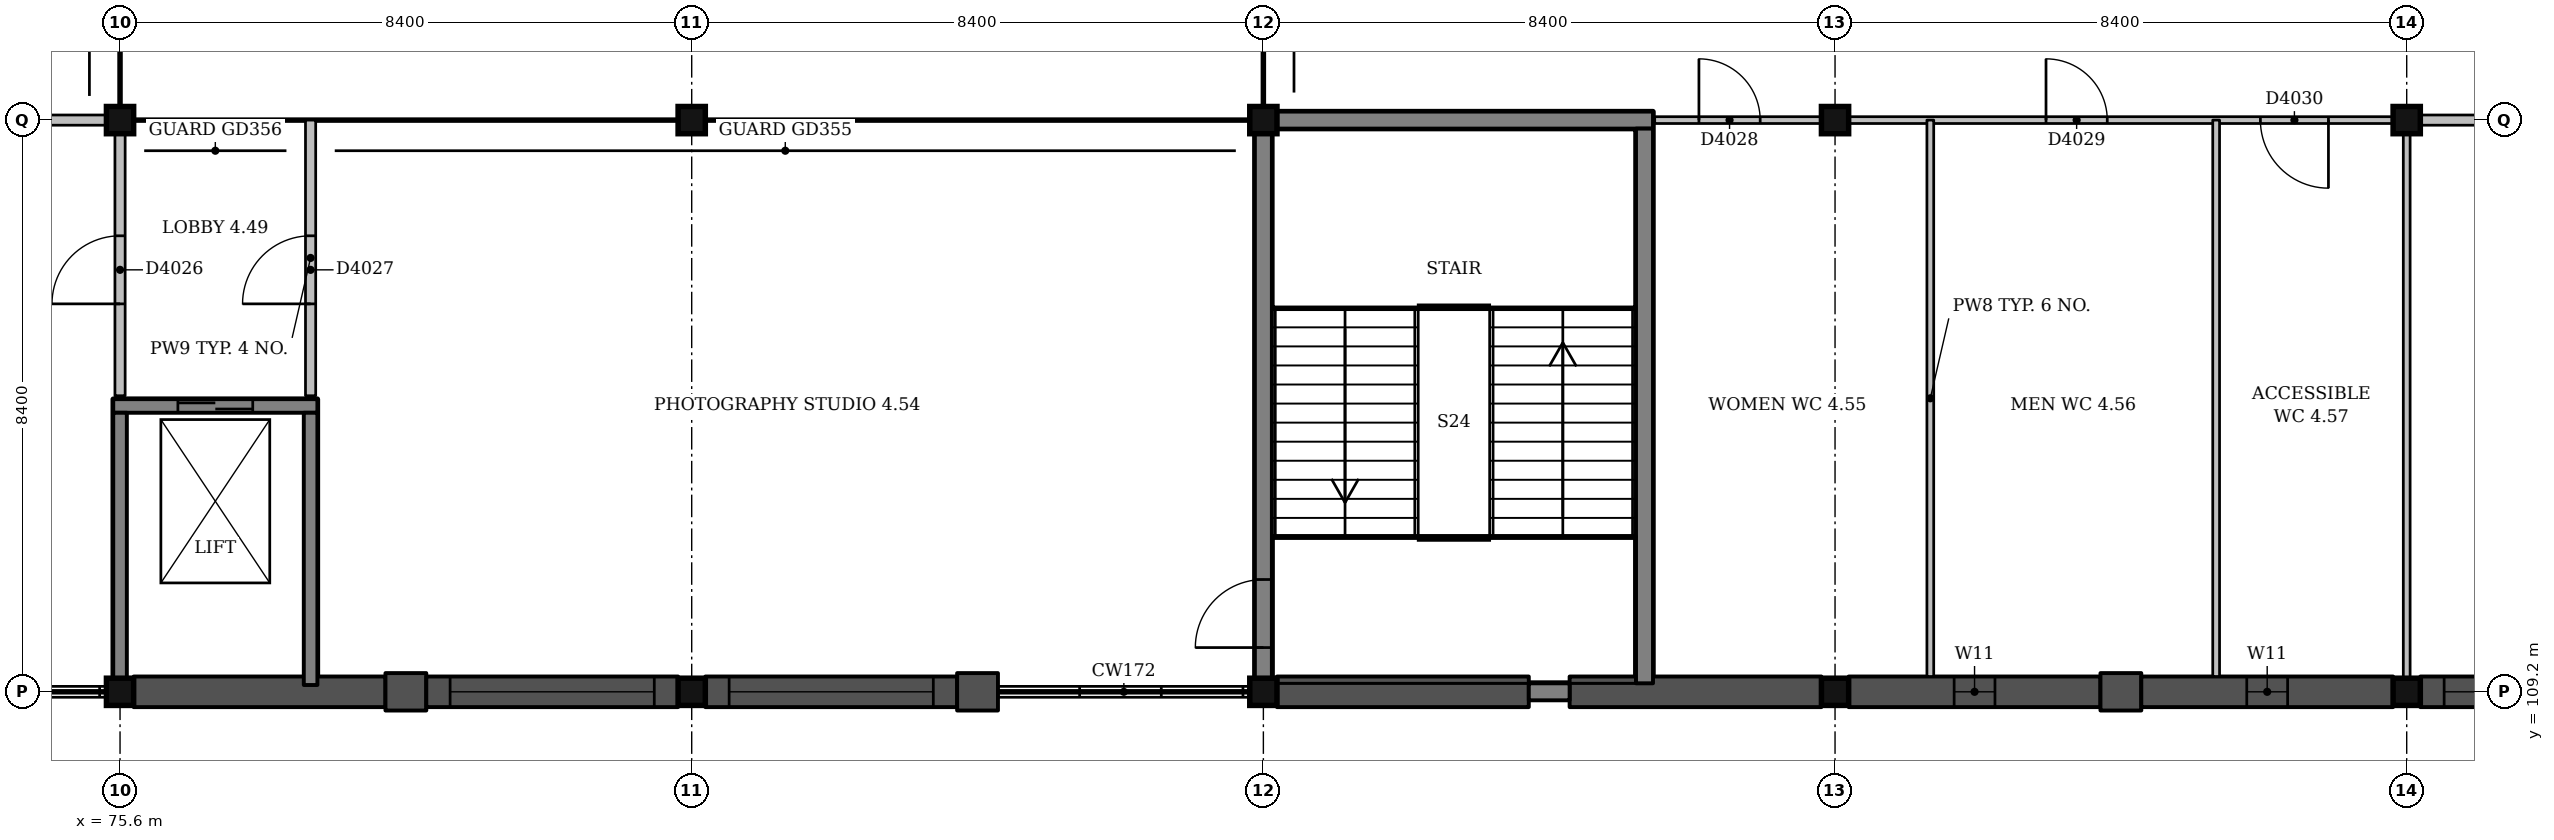
"""IFC4 building model, lengths in metres.
Left out: names, types, materials, properties, quantities, classifications, styles, units other than length and angle.
Written with IfcOpenShell. Run it as: python <this file> out.ifc"""

import sys

from ifc_helpers import new_model, si_unit, direction, frame, frame_2d, origin, origin_2d, place, context, subcontext, project, spatial, rectangle, extrude, element, fill, save


model = new_model("IFC4")
c1 = context("Model", 3, precision=1e-05, world=origin(), true_north=direction((0.0, 1.0)))
c2 = subcontext(c1, "Body", "Model", "MODEL_VIEW")
j1 = project(units=[si_unit("LENGTHUNIT", "METRE"), si_unit("PLANEANGLEUNIT", "RADIAN")], contexts=[c1])
p1 = place(None, origin())
s1 = spatial("IfcSite", under=j1, at=p1, CompositionType="ELEMENT")
p2 = place(p1, origin())
s2 = spatial("IfcBuilding", under=s1, at=p2, CompositionType="ELEMENT")
p3 = place(p2, frame((0.0, 0.0, 18.0)))
s3 = spatial("IfcBuildingStorey", under=s2, at=p3, CompositionType="ELEMENT", Elevation=18.0)
for number, where, z_axis, x_axis in (
    (1, (75.6, 109.2, 0.0), (0.0, 0.0, 1.0), (1.0, 0.0, 0.0)),
    (2, (75.6, 117.6, 0.0), (0.0, 0.0, 1.0), (1.0, 0.0, 0.0)),
    (3, (84.0, 109.2, 0.0), (0.0, 0.0, 1.0), (1.0, 0.0, 0.0)),
    (4, (84.0, 117.6, 0.0), (0.0, 0.0, 1.0), (1.0, 0.0, 0.0)),
    (5, (92.4, 109.2, 0.0), (0.0, 0.0, 1.0), (1.0, 0.0, 0.0)),
    (6, (92.4, 117.6, 0.0), (0.0, 0.0, 1.0), (1.0, 0.0, 0.0)),
    (7, (100.8, 109.2, 0.0), (0.0, 0.0, 1.0), (1.0, 0.0, 0.0)),
    (8, (100.8, 117.6, 0.0), (0.0, 0.0, 1.0), (1.0, 0.0, 0.0)),
    (9, (109.2, 109.2, 0.0), (0.0, 0.0, 1.0), (1.0, 0.0, 0.0)),
    (10, (109.2, 117.6, 0.0), (0.0, 0.0, 1.0), (1.0, 0.0, 0.0)),
):
    element("IfcColumn", number, at=place(p3, frame(where, z_axis=z_axis, x_axis=x_axis)), inside=s3, PredefinedType="COLUMN", context=c2, shape_type="SweptSolid", body=[
        extrude(rectangle(XDim=0.4, YDim=0.4, at=origin_2d()), origin(), (0.0, 0.0, 1.0), 4.5),
    ])
p4 = place(p3, frame((75.5, 113.4, 0.0), z_axis=(0.0, 0.0, 1.0), x_axis=(1.0, 0.0, 0.0)))
e11 = element("IfcWall", 11, at=p4, inside=s3, PredefinedType="SHEAR", context=c2, shape_type="SweptSolid", body=[
    extrude(rectangle(XDim=3.0, YDim=0.2, at=frame_2d((1.5, 0.0))), origin(), (0.0, 0.0, 1.0), 4.5),
])
p5 = place(p4, frame((0.95, 0.0, 0.0)))
e12 = element("IfcOpeningElement", 12, at=p5, cuts=e11, PredefinedType="OPENING", context=c2, shape_type="SweptSolid", body=[
    extrude(rectangle(XDim=1.1, YDim=2.1, at=frame_2d((0.55, 1.05))), frame((0.0, 0.11, 0.0), z_axis=(0.0, -1.0, 0.0), x_axis=(1.0, 0.0, 0.0)), (0.0, 0.0, 1.0), 0.22),
])
p6 = place(p3, frame((75.6, 109.4, 0.0), z_axis=(0.0, 0.0, 1.0), x_axis=(0.0, 1.0, 0.0)))
e13 = element("IfcWall", 13, at=p6, inside=s3, PredefinedType="SHEAR", context=c2, shape_type="SweptSolid", body=[
    extrude(rectangle(XDim=3.9, YDim=0.2, at=frame_2d((1.95, 0.0))), origin(), (0.0, 0.0, 1.0), 4.5),
])
p7 = place(p3, frame((78.4, 109.3, 0.0), z_axis=(0.0, 0.0, 1.0), x_axis=(0.0, 1.0, 0.0)))
e14 = element("IfcWall", 14, at=p7, inside=s3, PredefinedType="SHEAR", context=c2, shape_type="SweptSolid", body=[
    extrude(rectangle(XDim=4.0, YDim=0.2, at=frame_2d((2.0, 0.0))), origin(), (0.0, 0.0, 1.0), 4.5),
])
p8 = place(p3, frame((92.6, 117.6, 0.0), z_axis=(0.0, 0.0, 1.0), x_axis=(1.0, 0.0, 0.0)))
e15 = element("IfcWall", 15, at=p8, inside=s3, PredefinedType="SHEAR", context=c2, shape_type="SweptSolid", body=[
    extrude(rectangle(XDim=5.525, YDim=0.25, at=frame_2d((2.762, 0.0))), origin(), (0.0, 0.0, 1.0), 4.5),
])
p9 = place(p3, frame((92.4, 109.4, 0.0), z_axis=(0.0, 0.0, 1.0), x_axis=(0.0, 1.0, 0.0)))
e16 = element("IfcWall", 16, at=p9, inside=s3, PredefinedType="SHEAR", context=c2, shape_type="SweptSolid", body=[
    extrude(rectangle(XDim=8.0, YDim=0.25, at=frame_2d((4.0, 0.0))), origin(), (0.0, 0.0, 1.0), 4.5),
])
p10 = place(p9, frame((0.45, 0.0, 0.0)))
e17 = element("IfcOpeningElement", 17, at=p10, cuts=e16, PredefinedType="OPENING", context=c2, shape_type="SweptSolid", body=[
    extrude(rectangle(XDim=1.0, YDim=2.1, at=frame_2d((0.5, 1.05))), frame((0.0, 0.135, 0.0), z_axis=(0.0, -1.0, 0.0), x_axis=(1.0, 0.0, 0.0)), (0.0, 0.0, 1.0), 0.27),
])
p11 = place(p3, frame((98.0, 109.325, 0.0), z_axis=(0.0, 0.0, 1.0), x_axis=(0.0, 1.0, 0.0)))
e18 = element("IfcWall", 18, at=p11, inside=s3, PredefinedType="SHEAR", context=c2, shape_type="SweptSolid", body=[
    extrude(rectangle(XDim=8.15, YDim=0.25, at=frame_2d((4.075, 0.0))), origin(), (0.0, 0.0, 1.0), 4.5),
])
p12 = place(p3, frame((75.8, 109.2, 0.0), z_axis=(0.0, 0.0, 1.0), x_axis=(1.0, 0.0, 0.0)))
e19 = element("IfcWall", 19, at=p12, inside=s3, PredefinedType="SOLIDWALL", context=c2, shape_type="SweptSolid", body=[
    extrude(rectangle(XDim=3.7, YDim=0.45, at=frame_2d((1.85, 0.0))), origin(), (0.0, 0.0, 1.0), 3.45),
])
p13 = place(p3, frame((79.5, 109.2, 0.0), z_axis=(0.0, 0.0, 1.0), x_axis=(1.0, 0.0, 0.0)))
e20 = element("IfcWall", 20, at=p13, inside=s3, PredefinedType="SOLIDWALL", context=c2, shape_type="SweptSolid", body=[
    extrude(rectangle(XDim=0.6, YDim=0.55, at=frame_2d((0.3, 0.0))), origin(), (0.0, 0.0, 1.0), 3.45),
])
p14 = place(p3, frame((80.1, 109.2, 0.0), z_axis=(0.0, 0.0, 1.0), x_axis=(1.0, 0.0, 0.0)))
e21 = element("IfcWall", 21, at=p14, inside=s3, PredefinedType="SOLIDWALL", context=c2, shape_type="SweptSolid", body=[
    extrude(rectangle(XDim=3.7, YDim=0.45, at=frame_2d((1.85, 0.0))), origin(), (0.0, 0.0, 1.0), 3.45),
])
p15 = place(p14, frame((0.35, 0.0, 0.9)))
e22 = element("IfcOpeningElement", 22, at=p15, cuts=e21, PredefinedType="OPENING", context=c2, shape_type="SweptSolid", body=[
    extrude(rectangle(XDim=3.0, YDim=2.1, at=frame_2d((1.5, 1.05))), frame((0.0, 0.235, 0.0), z_axis=(0.0, -1.0, 0.0), x_axis=(1.0, 0.0, 0.0)), (0.0, 0.0, 1.0), 0.47),
])
p16 = place(p3, frame((84.2, 109.2, 0.0), z_axis=(0.0, 0.0, 1.0), x_axis=(1.0, 0.0, 0.0)))
e23 = element("IfcWall", 23, at=p16, inside=s3, PredefinedType="SOLIDWALL", context=c2, shape_type="SweptSolid", body=[
    extrude(rectangle(XDim=3.7, YDim=0.45, at=frame_2d((1.85, 0.0))), origin(), (0.0, 0.0, 1.0), 4.2),
])
p17 = place(p16, frame((0.35, 0.0, 0.9)))
e24 = element("IfcOpeningElement", 24, at=p17, cuts=e23, PredefinedType="OPENING", context=c2, shape_type="SweptSolid", body=[
    extrude(rectangle(XDim=3.0, YDim=2.1, at=frame_2d((1.5, 1.05))), frame((0.0, 0.235, 0.0), z_axis=(0.0, -1.0, 0.0), x_axis=(1.0, 0.0, 0.0)), (0.0, 0.0, 1.0), 0.47),
])
p18 = place(p3, frame((87.9, 109.2, 0.0), z_axis=(0.0, 0.0, 1.0), x_axis=(1.0, 0.0, 0.0)))
e25 = element("IfcWall", 25, at=p18, inside=s3, PredefinedType="SOLIDWALL", context=c2, shape_type="SweptSolid", body=[
    extrude(rectangle(XDim=0.6, YDim=0.55, at=frame_2d((0.3, 0.0))), origin(), (0.0, 0.0, 1.0), 4.2),
])
p19 = place(p3, frame((92.6, 109.2, 0.0), z_axis=(0.0, 0.0, 1.0), x_axis=(1.0, 0.0, 0.0)))
e26 = element("IfcWall", 26, at=p19, inside=s3, PredefinedType="SOLIDWALL", context=c2, shape_type="SweptSolid", body=[
    extrude(rectangle(XDim=3.7, YDim=0.45, at=frame_2d((1.85, 0.0))), origin(), (0.0, 0.0, 1.0), 3.45),
])
p20 = place(p3, frame((96.9, 109.2, 0.0), z_axis=(0.0, 0.0, 1.0), x_axis=(1.0, 0.0, 0.0)))
e27 = element("IfcWall", 27, at=p20, inside=s3, PredefinedType="SOLIDWALL", context=c2, shape_type="SweptSolid", body=[
    extrude(rectangle(XDim=3.7, YDim=0.45, at=frame_2d((1.85, 0.0))), origin(), (0.0, 0.0, 1.0), 3.45),
])
p21 = place(p3, frame((101.0, 109.2, 0.0), z_axis=(0.0, 0.0, 1.0), x_axis=(1.0, 0.0, 0.0)))
e28 = element("IfcWall", 28, at=p21, inside=s3, PredefinedType="SOLIDWALL", context=c2, shape_type="SweptSolid", body=[
    extrude(rectangle(XDim=3.7, YDim=0.45, at=frame_2d((1.85, 0.0))), origin(), (0.0, 0.0, 1.0), 3.45),
])
p22 = place(p21, frame((1.55, 0.0, 1.5)))
e29 = element("IfcOpeningElement", 29, at=p22, cuts=e28, PredefinedType="OPENING", context=c2, shape_type="SweptSolid", body=[
    extrude(rectangle(XDim=0.6, YDim=1.2, at=frame_2d((0.3, 0.6))), frame((0.0, 0.235, 0.0), z_axis=(0.0, -1.0, 0.0), x_axis=(1.0, 0.0, 0.0)), (0.0, 0.0, 1.0), 0.47),
])
p23 = place(p3, frame((104.7, 109.2, 0.0), z_axis=(0.0, 0.0, 1.0), x_axis=(1.0, 0.0, 0.0)))
e30 = element("IfcWall", 30, at=p23, inside=s3, PredefinedType="SOLIDWALL", context=c2, shape_type="SweptSolid", body=[
    extrude(rectangle(XDim=0.6, YDim=0.55, at=frame_2d((0.3, 0.0))), origin(), (0.0, 0.0, 1.0), 3.45),
])
p24 = place(p3, frame((105.3, 109.2, 0.0), z_axis=(0.0, 0.0, 1.0), x_axis=(1.0, 0.0, 0.0)))
e31 = element("IfcWall", 31, at=p24, inside=s3, PredefinedType="SOLIDWALL", context=c2, shape_type="SweptSolid", body=[
    extrude(rectangle(XDim=3.7, YDim=0.45, at=frame_2d((1.85, 0.0))), origin(), (0.0, 0.0, 1.0), 3.45),
])
p25 = place(p24, frame((1.55, 0.0, 1.5)))
e32 = element("IfcOpeningElement", 32, at=p25, cuts=e31, PredefinedType="OPENING", context=c2, shape_type="SweptSolid", body=[
    extrude(rectangle(XDim=0.6, YDim=1.2, at=frame_2d((0.3, 0.6))), frame((0.0, 0.235, 0.0), z_axis=(0.0, -1.0, 0.0), x_axis=(1.0, 0.0, 0.0)), (0.0, 0.0, 1.0), 0.47),
])
p26 = place(p3, frame((109.4, 109.2, 0.0), z_axis=(0.0, 0.0, 1.0), x_axis=(1.0, 0.0, 0.0)))
e33 = element("IfcWall", 33, at=p26, inside=s3, PredefinedType="SOLIDWALL", context=c2, shape_type="SweptSolid", body=[
    extrude(rectangle(XDim=3.7, YDim=0.45, at=frame_2d((1.85, 0.0))), origin(), (0.0, 0.0, 1.0), 3.45),
])
p27 = place(p26, frame((0.35, 0.0, 0.9)))
e34 = element("IfcOpeningElement", 34, at=p27, cuts=e33, PredefinedType="OPENING", context=c2, shape_type="SweptSolid", body=[
    extrude(rectangle(XDim=3.0, YDim=2.1, at=frame_2d((1.5, 1.05))), frame((0.0, 0.235, 0.0), z_axis=(0.0, -1.0, 0.0), x_axis=(1.0, 0.0, 0.0)), (0.0, 0.0, 1.0), 0.47),
])
p28 = place(p3, frame((67.4, 117.6, 0.0), z_axis=(0.0, 0.0, 1.0), x_axis=(1.0, 0.0, 0.0)))
e35 = element("IfcWall", 35, at=p28, inside=s3, PredefinedType="PARTITIONING", context=c2, shape_type="SweptSolid", body=[
    extrude(rectangle(XDim=8.0, YDim=0.15, at=frame_2d((4.0, 0.0))), origin(), (0.0, 0.0, 1.0), 3.6),
])
p29 = place(p3, frame((109.4, 117.6, 0.0), z_axis=(0.0, 0.0, 1.0), x_axis=(1.0, 0.0, 0.0)))
e36 = element("IfcWall", 36, at=p29, inside=s3, PredefinedType="PARTITIONING", context=c2, shape_type="SweptSolid", body=[
    extrude(rectangle(XDim=8.0, YDim=0.15, at=frame_2d((4.0, 0.0))), origin(), (0.0, 0.0, 1.0), 3.5),
])
p30 = place(p29, frame((3.45, 0.0, 0.0)))
e37 = element("IfcOpeningElement", 37, at=p30, cuts=e36, PredefinedType="OPENING", context=c2, shape_type="SweptSolid", body=[
    extrude(rectangle(XDim=0.9, YDim=2.1, at=frame_2d((0.45, 1.05))), frame((0.0, 0.085, 0.0), z_axis=(0.0, -1.0, 0.0), x_axis=(1.0, 0.0, 0.0)), (0.0, 0.0, 1.0), 0.17),
])
p31 = place(p3, frame((98.15, 117.6, 0.0), z_axis=(0.0, 0.0, 1.0), x_axis=(1.0, 0.0, 0.0)))
e38 = element("IfcWall", 38, at=p31, inside=s3, PredefinedType="PARTITIONING", context=c2, shape_type="SweptSolid", body=[
    extrude(rectangle(XDim=2.45, YDim=0.1, at=frame_2d((1.225, 0.0))), origin(), (0.0, 0.0, 1.0), 3.6),
])
p32 = place(p31, frame((0.65, 0.0, 0.0)))
e39 = element("IfcOpeningElement", 39, at=p32, cuts=e38, PredefinedType="OPENING", context=c2, shape_type="SweptSolid", body=[
    extrude(rectangle(XDim=0.9, YDim=2.1, at=frame_2d((0.45, 1.05))), frame((0.0, 0.06, 0.0), z_axis=(0.0, -1.0, 0.0), x_axis=(1.0, 0.0, 0.0)), (0.0, 0.0, 1.0), 0.12),
])
p33 = place(p3, frame((101.0, 117.6, 0.0), z_axis=(0.0, 0.0, 1.0), x_axis=(1.0, 0.0, 0.0)))
e40 = element("IfcWall", 40, at=p33, inside=s3, PredefinedType="PARTITIONING", context=c2, shape_type="SweptSolid", body=[
    extrude(rectangle(XDim=8.0, YDim=0.1, at=frame_2d((4.0, 0.0))), origin(), (0.0, 0.0, 1.0), 3.5),
])
p34 = place(p33, frame((2.9, 0.0, 0.0)))
e41 = element("IfcOpeningElement", 41, at=p34, cuts=e40, PredefinedType="OPENING", context=c2, shape_type="SweptSolid", body=[
    extrude(rectangle(XDim=0.9, YDim=2.1, at=frame_2d((0.45, 1.05))), frame((0.0, 0.06, 0.0), z_axis=(0.0, -1.0, 0.0), x_axis=(1.0, 0.0, 0.0)), (0.0, 0.0, 1.0), 0.12),
])
p35 = place(p33, frame((6.05, 0.0, 0.0)))
e42 = element("IfcOpeningElement", 42, at=p35, cuts=e40, PredefinedType="OPENING", context=c2, shape_type="SweptSolid", body=[
    extrude(rectangle(XDim=1.0, YDim=2.1, at=frame_2d((0.5, 1.05))), frame((0.0, 0.06, 0.0), z_axis=(0.0, -1.0, 0.0), x_axis=(1.0, 0.0, 0.0)), (0.0, 0.0, 1.0), 0.12),
])
p36 = place(p3, frame((75.6, 113.55, 0.0), z_axis=(0.0, 0.0, 1.0), x_axis=(0.0, 1.0, 0.0)))
e43 = element("IfcWall", 43, at=p36, inside=s3, PredefinedType="PARTITIONING", context=c2, shape_type="SweptSolid", body=[
    extrude(rectangle(XDim=3.85, YDim=0.15, at=frame_2d((1.925, 0.0))), origin(), (0.0, 0.0, 1.0), 3.45),
])
p37 = place(p36, frame((1.35, 0.0, 0.0)))
e44 = element("IfcOpeningElement", 44, at=p37, cuts=e43, PredefinedType="OPENING", context=c2, shape_type="SweptSolid", body=[
    extrude(rectangle(XDim=1.0, YDim=2.1, at=frame_2d((0.5, 1.05))), frame((0.0, 0.085, 0.0), z_axis=(0.0, -1.0, 0.0), x_axis=(1.0, 0.0, 0.0)), (0.0, 0.0, 1.0), 0.17),
])
p38 = place(p3, frame((78.4, 113.55, 0.0), z_axis=(0.0, 0.0, 1.0), x_axis=(0.0, 1.0, 0.0)))
e45 = element("IfcWall", 45, at=p38, inside=s3, PredefinedType="PARTITIONING", context=c2, shape_type="SweptSolid", body=[
    extrude(rectangle(XDim=4.05, YDim=0.15, at=frame_2d((2.025, 0.0))), origin(), (0.0, 0.0, 1.0), 3.45),
])
p39 = place(p38, frame((1.35, 0.0, 0.0)))
e46 = element("IfcOpeningElement", 46, at=p39, cuts=e45, PredefinedType="OPENING", context=c2, shape_type="SweptSolid", body=[
    extrude(rectangle(XDim=1.0, YDim=2.1, at=frame_2d((0.5, 1.05))), frame((0.0, 0.085, 0.0), z_axis=(0.0, -1.0, 0.0), x_axis=(1.0, 0.0, 0.0)), (0.0, 0.0, 1.0), 0.17),
])
for number, where, z_axis, x_axis in (
    (47, (102.2, 109.425, 0.0), (0.0, 0.0, 1.0), (0.0, 1.0, 0.0)),
    (48, (106.4, 109.425, 0.0), (0.0, 0.0, 1.0), (0.0, 1.0, 0.0)),
):
    element("IfcWall", number, at=place(p3, frame(where, z_axis=z_axis, x_axis=x_axis)), inside=s3, PredefinedType="PARTITIONING", context=c2, shape_type="SweptSolid", body=[
        extrude(rectangle(XDim=8.175, YDim=0.1, at=frame_2d((4.087, 0.0))), origin(), (0.0, 0.0, 1.0), 3.5),
    ])
p40 = place(p3, frame((109.2, 109.4, 0.0), z_axis=(0.0, 0.0, 1.0), x_axis=(0.0, 1.0, 0.0)))
e49 = element("IfcWall", 49, at=p40, inside=s3, PredefinedType="PARTITIONING", context=c2, shape_type="SweptSolid", body=[
    extrude(rectangle(XDim=8.0, YDim=0.1, at=frame_2d((4.0, 0.0))), origin(), (0.0, 0.0, 1.0), 4.15),
])
p41 = place(p3, frame((96.3, 109.2, 0.0), z_axis=(0.0, 0.0, 1.0), x_axis=(1.0, 0.0, 0.0)))
e50 = element("IfcWall", 50, at=p41, inside=s3, PredefinedType="SHEAR", context=c2, shape_type="SweptSolid", body=[
    extrude(rectangle(XDim=0.6, YDim=0.25, at=frame_2d((0.3, 0.0))), origin(), (0.0, 0.0, 1.0), 4.5),
])
p42 = place(p15, origin())
e51 = element("IfcWindow", 51, at=p42, inside=s3, PartitioningType="SINGLE_PANEL", PredefinedType="WINDOW", context=c2, shape_type="SweptSolid", body=[
    extrude(rectangle(XDim=3.0, YDim=2.1, at=frame_2d((1.5, 1.05))), frame((0.0, 0.135, 0.0), z_axis=(0.0, -1.0, 0.0), x_axis=(1.0, 0.0, 0.0)), (0.0, 0.0, 1.0), 0.06),
])
fill(e22, e51)
p43 = place(p17, origin())
e52 = element("IfcWindow", 52, at=p43, inside=s3, PartitioningType="SINGLE_PANEL", PredefinedType="WINDOW", context=c2, shape_type="SweptSolid", body=[
    extrude(rectangle(XDim=3.0, YDim=2.1, at=frame_2d((1.5, 1.05))), frame((0.0, 0.135, 0.0), z_axis=(0.0, -1.0, 0.0), x_axis=(1.0, 0.0, 0.0)), (0.0, 0.0, 1.0), 0.06),
])
fill(e24, e52)
p44 = place(p22, origin())
e53 = element("IfcWindow", 53, at=p44, inside=s3, PartitioningType="SINGLE_PANEL", PredefinedType="WINDOW", context=c2, shape_type="SweptSolid", body=[
    extrude(rectangle(XDim=0.6, YDim=1.2, at=frame_2d((0.3, 0.6))), frame((0.0, 0.135, 0.0), z_axis=(0.0, -1.0, 0.0), x_axis=(1.0, 0.0, 0.0)), (0.0, 0.0, 1.0), 0.06),
])
fill(e29, e53)
p45 = place(p25, origin())
e54 = element("IfcWindow", 54, at=p45, inside=s3, PartitioningType="SINGLE_PANEL", PredefinedType="WINDOW", context=c2, shape_type="SweptSolid", body=[
    extrude(rectangle(XDim=0.6, YDim=1.2, at=frame_2d((0.3, 0.6))), frame((0.0, 0.135, 0.0), z_axis=(0.0, -1.0, 0.0), x_axis=(1.0, 0.0, 0.0)), (0.0, 0.0, 1.0), 0.06),
])
fill(e32, e54)
p46 = place(p27, origin())
e55 = element("IfcWindow", 55, at=p46, inside=s3, PartitioningType="SINGLE_PANEL", PredefinedType="WINDOW", context=c2, shape_type="SweptSolid", body=[
    extrude(rectangle(XDim=3.0, YDim=2.1, at=frame_2d((1.5, 1.05))), frame((0.0, 0.135, 0.0), z_axis=(0.0, -1.0, 0.0), x_axis=(1.0, 0.0, 0.0)), (0.0, 0.0, 1.0), 0.06),
])
fill(e34, e55)
p47 = place(p37, origin())
e56 = element("IfcDoor", 56, at=p47, inside=s3, OperationType="SINGLE_SWING_LEFT", PredefinedType="DOOR", context=c2, shape_type="SweptSolid", body=[
    extrude(rectangle(XDim=1.0, YDim=2.1, at=frame_2d((0.5, 1.05))), frame((0.0, 0.025, 0.0), z_axis=(0.0, -1.0, 0.0), x_axis=(1.0, 0.0, 0.0)), (0.0, 0.0, 1.0), 0.05),
])
fill(e44, e56)
p48 = place(p39, origin())
e57 = element("IfcDoor", 57, at=p48, inside=s3, OperationType="SINGLE_SWING_LEFT", PredefinedType="DOOR", context=c2, shape_type="SweptSolid", body=[
    extrude(rectangle(XDim=1.0, YDim=2.1, at=frame_2d((0.5, 1.05))), frame((0.0, 0.025, 0.0), z_axis=(0.0, -1.0, 0.0), x_axis=(1.0, 0.0, 0.0)), (0.0, 0.0, 1.0), 0.05),
])
fill(e46, e57)
p49 = place(p32, origin())
e58 = element("IfcDoor", 58, at=p49, inside=s3, OperationType="SINGLE_SWING_LEFT", PredefinedType="DOOR", context=c2, shape_type="SweptSolid", body=[
    extrude(rectangle(XDim=0.9, YDim=2.1, at=frame_2d((0.45, 1.05))), frame((0.0, 0.025, 0.0), z_axis=(0.0, -1.0, 0.0), x_axis=(1.0, 0.0, 0.0)), (0.0, 0.0, 1.0), 0.05),
])
fill(e39, e58)
p50 = place(p34, origin())
e59 = element("IfcDoor", 59, at=p50, inside=s3, OperationType="SINGLE_SWING_LEFT", PredefinedType="DOOR", context=c2, shape_type="SweptSolid", body=[
    extrude(rectangle(XDim=0.9, YDim=2.1, at=frame_2d((0.45, 1.05))), frame((0.0, 0.025, 0.0), z_axis=(0.0, -1.0, 0.0), x_axis=(1.0, 0.0, 0.0)), (0.0, 0.0, 1.0), 0.05),
])
fill(e41, e59)
p51 = place(p35, origin())
e60 = element("IfcDoor", 60, at=p51, inside=s3, OperationType="SINGLE_SWING_RIGHT", PredefinedType="DOOR", context=c2, shape_type="SweptSolid", body=[
    extrude(rectangle(XDim=1.0, YDim=2.1, at=frame_2d((0.5, 1.05))), frame((0.0, 0.025, 0.0), z_axis=(0.0, -1.0, 0.0), x_axis=(1.0, 0.0, 0.0)), (0.0, 0.0, 1.0), 0.05),
])
fill(e42, e60)
p52 = place(p10, origin())
e61 = element("IfcDoor", 61, at=p52, inside=s3, OperationType="SINGLE_SWING_LEFT", PredefinedType="DOOR", context=c2, shape_type="SweptSolid", body=[
    extrude(rectangle(XDim=1.0, YDim=2.1, at=frame_2d((0.5, 1.05))), frame((0.0, 0.025, 0.0), z_axis=(0.0, -1.0, 0.0), x_axis=(1.0, 0.0, 0.0)), (0.0, 0.0, 1.0), 0.05),
])
fill(e17, e61)
p53 = place(p5, origin())
e62 = element("IfcDoor", 62, at=p53, inside=s3, OperationType="SLIDING_TO_LEFT", PredefinedType="DOOR", context=c2, shape_type="SweptSolid", body=[
    extrude(rectangle(XDim=1.1, YDim=2.1, at=frame_2d((0.55, 1.05))), frame((0.0, 0.025, 0.0), z_axis=(0.0, -1.0, 0.0), x_axis=(1.0, 0.0, 0.0)), (0.0, 0.0, 1.0), 0.05),
])
fill(e12, e62)
save(model, sys.argv[1])
